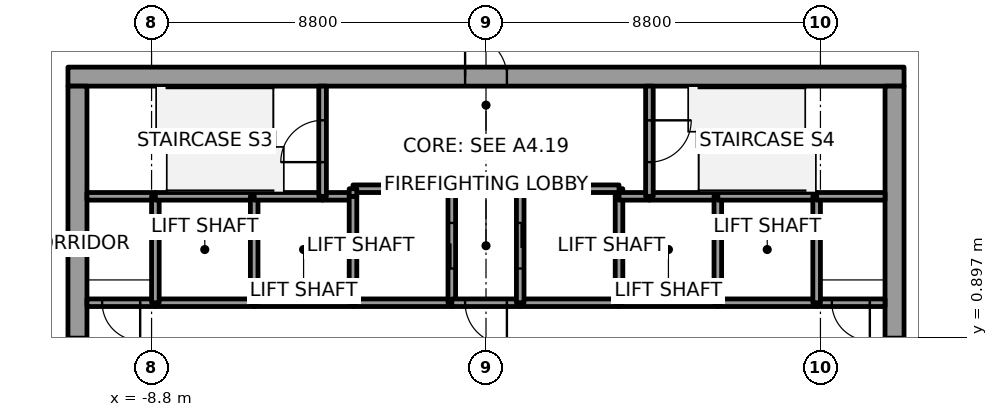
"""IFC4 building model, lengths in metres.
Left out: names, types, materials, properties, quantities, classifications, styles, units other than length and angle.
Written with IfcOpenShell. Run it as: python <this file> out.ifc"""

import sys

from ifc_helpers import new_model, si_unit, direction, frame, frame_2d, origin, place, context, subcontext, project, spatial, rectangle, extrude, element, fill, save


model = new_model("IFC4")
c1 = context("Model", 3, precision=1e-05, world=origin(), true_north=direction((0.0, 1.0)))
c2 = subcontext(c1, "Body", "Model", "MODEL_VIEW")
j1 = project(units=[si_unit("LENGTHUNIT", "METRE"), si_unit("PLANEANGLEUNIT", "RADIAN")], contexts=[c1])
p1 = place(None, origin())
s1 = spatial("IfcSite", under=j1, at=p1, CompositionType="ELEMENT")
p2 = place(p1, origin())
s2 = spatial("IfcBuilding", under=s1, at=p2, CompositionType="ELEMENT")
p3 = place(p2, frame((0.0, 0.0, 85.0)))
s3 = spatial("IfcBuildingStorey", under=s2, at=p3, CompositionType="ELEMENT", Elevation=85.0)
p4 = place(p3, frame((-11.0, 7.75, 0.0), z_axis=(0.0, 0.0, 1.0), x_axis=(1.0, 0.0, 0.0)))
e1 = element("IfcWall", 1, at=p4, inside=s3, PredefinedType="SHEAR", context=c2, shape_type="SweptSolid", body=[
    extrude(rectangle(XDim=22.0, YDim=0.5, at=frame_2d((11.0, 0.0))), origin(), (0.0, 0.0, 1.0), 3.7),
])
p5 = place(p4, frame((10.45, 0.0, 0.0)))
e2 = element("IfcOpeningElement", 2, at=p5, cuts=e1, PredefinedType="OPENING", context=c2, shape_type="SweptSolid", body=[
    extrude(rectangle(XDim=1.1, YDim=2.1, at=frame_2d((0.55, 1.05))), frame((0.0, 0.25, 0.0), z_axis=(0.0, -1.0, 0.0), x_axis=(1.0, 0.0, 0.0)), (0.0, 0.0, 1.0), 0.5),
])
p6 = place(p3, frame((-10.75, -7.5, 0.0), z_axis=(0.0, 0.0, 1.0), x_axis=(0.0, 1.0, 0.0)))
e3 = element("IfcWall", 3, at=p6, inside=s3, PredefinedType="SHEAR", context=c2, shape_type="SweptSolid", body=[
    extrude(rectangle(XDim=15.0, YDim=0.5, at=frame_2d((7.5, 0.0))), origin(), (0.0, 0.0, 1.0), 3.7),
])
p7 = place(p6, frame((6.6, 0.0, 0.0)))
e4 = element("IfcOpeningElement", 4, at=p7, cuts=e3, PredefinedType="OPENING", context=c2, shape_type="SweptSolid", body=[
    extrude(rectangle(XDim=1.8, YDim=2.1, at=frame_2d((0.9, 1.05))), frame((0.0, 0.25, 0.0), z_axis=(0.0, -1.0, 0.0), x_axis=(1.0, 0.0, 0.0)), (0.0, 0.0, 1.0), 0.5),
])
p8 = place(p3, frame((10.75, -7.5, 0.0), z_axis=(0.0, 0.0, 1.0), x_axis=(0.0, 1.0, 0.0)))
e5 = element("IfcWall", 5, at=p8, inside=s3, PredefinedType="SHEAR", context=c2, shape_type="SweptSolid", body=[
    extrude(rectangle(XDim=15.0, YDim=0.5, at=frame_2d((7.5, 0.0))), origin(), (0.0, 0.0, 1.0), 3.7),
])
p9 = place(p8, frame((6.6, 0.0, 0.0)))
e6 = element("IfcOpeningElement", 6, at=p9, cuts=e5, PredefinedType="OPENING", context=c2, shape_type="SweptSolid", body=[
    extrude(rectangle(XDim=1.8, YDim=2.1, at=frame_2d((0.9, 1.05))), frame((0.0, 0.25, 0.0), z_axis=(0.0, -1.0, 0.0), x_axis=(1.0, 0.0, 0.0)), (0.0, 0.0, 1.0), 0.5),
])
p10 = place(p3, frame((-8.7, 1.8, 0.0), z_axis=(0.0, 0.0, 1.0), x_axis=(-1.0, 0.0, 0.0)))
e7 = element("IfcWall", 7, at=p10, inside=s3, PredefinedType="SOLIDWALL", context=c2, shape_type="SweptSolid", body=[
    extrude(rectangle(XDim=1.8, YDim=0.2, at=frame_2d((0.9, 0.0))), origin(), (0.0, 0.0, 1.0), 3.55),
])
p11 = place(p10, frame((0.4, 0.0, 0.0)))
e8 = element("IfcOpeningElement", 8, at=p11, cuts=e7, PredefinedType="OPENING", context=c2, shape_type="SweptSolid", body=[
    extrude(rectangle(XDim=1.0, YDim=2.1, at=frame_2d((0.5, 1.05))), frame((0.0, 0.1, 0.0), z_axis=(0.0, -1.0, 0.0), x_axis=(1.0, 0.0, 0.0)), (0.0, 0.0, 1.0), 0.2),
])
p12 = place(p3, frame((-8.7, 4.6, 0.0), z_axis=(0.0, 0.0, 1.0), x_axis=(-1.0, 0.0, 0.0)))
e9 = element("IfcWall", 9, at=p12, inside=s3, PredefinedType="SOLIDWALL", context=c2, shape_type="SweptSolid", body=[
    extrude(rectangle(XDim=1.8, YDim=0.2, at=frame_2d((0.9, 0.0))), origin(), (0.0, 0.0, 1.0), 3.55),
])
p13 = place(p3, frame((-6.1, 1.8, 0.0), z_axis=(0.0, 0.0, 1.0), x_axis=(-1.0, 0.0, 0.0)))
e10 = element("IfcWall", 10, at=p13, inside=s3, PredefinedType="SOLIDWALL", context=c2, shape_type="SweptSolid", body=[
    extrude(rectangle(XDim=2.6, YDim=0.2, at=frame_2d((1.3, 0.0))), origin(), (0.0, 0.0, 1.0), 3.55),
])
p14 = place(p3, frame((-8.7, 1.8, 0.0), z_axis=(0.0, 0.0, 1.0), x_axis=(0.0, 1.0, 0.0)))
e11 = element("IfcWall", 11, at=p14, inside=s3, PredefinedType="SOLIDWALL", context=c2, shape_type="SweptSolid", body=[
    extrude(rectangle(XDim=2.8, YDim=0.2, at=frame_2d((1.4, 0.0))), origin(), (0.0, 0.0, 1.0), 3.55),
])
p15 = place(p3, frame((-6.1, 4.6, 0.0), z_axis=(0.0, 0.0, 1.0), x_axis=(-1.0, 0.0, 0.0)))
e12 = element("IfcWall", 12, at=p15, inside=s3, PredefinedType="SOLIDWALL", context=c2, shape_type="SweptSolid", body=[
    extrude(rectangle(XDim=2.6, YDim=0.2, at=frame_2d((1.3, 0.0))), origin(), (0.0, 0.0, 1.0), 3.55),
])
p16 = place(p3, frame((-3.5, 1.8, 0.0), z_axis=(0.0, 0.0, 1.0), x_axis=(-1.0, 0.0, 0.0)))
e13 = element("IfcWall", 13, at=p16, inside=s3, PredefinedType="SOLIDWALL", context=c2, shape_type="SweptSolid", body=[
    extrude(rectangle(XDim=2.6, YDim=0.2, at=frame_2d((1.3, 0.0))), origin(), (0.0, 0.0, 1.0), 3.55),
])
p17 = place(p3, frame((-6.1, 1.8, 0.0), z_axis=(0.0, 0.0, 1.0), x_axis=(0.0, 1.0, 0.0)))
e14 = element("IfcWall", 14, at=p17, inside=s3, PredefinedType="SOLIDWALL", context=c2, shape_type="SweptSolid", body=[
    extrude(rectangle(XDim=2.8, YDim=0.2, at=frame_2d((1.4, 0.0))), origin(), (0.0, 0.0, 1.0), 3.55),
])
p18 = place(p3, frame((-4.3, 4.6, 0.0), z_axis=(0.0, 0.0, 1.0), x_axis=(-1.0, 0.0, 0.0)))
e15 = element("IfcWall", 15, at=p18, inside=s3, PredefinedType="SOLIDWALL", context=c2, shape_type="SweptSolid", body=[
    extrude(rectangle(XDim=1.8, YDim=0.2, at=frame_2d((0.9, 0.0))), origin(), (0.0, 0.0, 1.0), 3.55),
])
p19 = place(p3, frame((-3.5, 4.6, 0.0), z_axis=(0.0, 0.0, 1.0), x_axis=(-1.0, 0.0, 0.0)))
e16 = element("IfcWall", 16, at=p19, inside=s3, PredefinedType="SOLIDWALL", context=c2, shape_type="SweptSolid", body=[
    extrude(rectangle(XDim=0.8, YDim=0.2, at=frame_2d((0.4, 0.0))), origin(), (0.0, 0.0, 1.0), 3.55),
])
p20 = place(p3, frame((-4.3, 4.6, 0.0), z_axis=(0.0, 0.0, 1.0), x_axis=(0.0, 1.0, 0.0)))
e17 = element("IfcWall", 17, at=p20, inside=s3, PredefinedType="SOLIDWALL", context=c2, shape_type="SweptSolid", body=[
    extrude(rectangle(XDim=2.9, YDim=0.2, at=frame_2d((1.45, 0.0))), origin(), (0.0, 0.0, 1.0), 3.55),
])
p21 = place(p20, frame((0.9, 0.0, 0.0)))
e18 = element("IfcOpeningElement", 18, at=p21, cuts=e17, PredefinedType="OPENING", context=c2, shape_type="SweptSolid", body=[
    extrude(rectangle(XDim=1.1, YDim=2.1, at=frame_2d((0.55, 1.05))), frame((0.0, 0.1, 0.0), z_axis=(0.0, -1.0, 0.0), x_axis=(1.0, 0.0, 0.0)), (0.0, 0.0, 1.0), 0.2),
])
p22 = place(p3, frame((-0.9, 1.8, 0.0), z_axis=(0.0, 0.0, 1.0), x_axis=(-1.0, 0.0, 0.0)))
e19 = element("IfcWall", 19, at=p22, inside=s3, PredefinedType="SOLIDWALL", context=c2, shape_type="SweptSolid", body=[
    extrude(rectangle(XDim=2.6, YDim=0.2, at=frame_2d((1.3, 0.0))), origin(), (0.0, 0.0, 1.0), 3.55),
])
p23 = place(p3, frame((-3.5, 4.6, 0.0), z_axis=(0.0, 0.0, 1.0), x_axis=(0.0, -1.0, 0.0)))
e20 = element("IfcWall", 20, at=p23, inside=s3, PredefinedType="SOLIDWALL", context=c2, shape_type="SweptSolid", body=[
    extrude(rectangle(XDim=2.8, YDim=0.2, at=frame_2d((1.4, 0.0))), origin(), (0.0, 0.0, 1.0), 3.55),
])
p24 = place(p3, frame((-0.9, 1.8, 0.0), z_axis=(0.0, 0.0, 1.0), x_axis=(0.0, 1.0, 0.0)))
e21 = element("IfcWall", 21, at=p24, inside=s3, PredefinedType="SOLIDWALL", context=c2, shape_type="SweptSolid", body=[
    extrude(rectangle(XDim=3.0, YDim=0.2, at=frame_2d((1.5, 0.0))), origin(), (0.0, 0.0, 1.0), 3.55),
])
p25 = place(p24, frame((0.9, 0.0, 0.0)))
e22 = element("IfcOpeningElement", 22, at=p25, cuts=e21, PredefinedType="OPENING", context=c2, shape_type="SweptSolid", body=[
    extrude(rectangle(XDim=1.2, YDim=2.1, at=frame_2d((0.6, 1.05))), frame((0.0, 0.1, 0.0), z_axis=(0.0, -1.0, 0.0), x_axis=(1.0, 0.0, 0.0)), (0.0, 0.0, 1.0), 0.2),
])
p26 = place(p3, frame((-0.9, 4.8, 0.0), z_axis=(0.0, 0.0, 1.0), x_axis=(-1.0, 0.0, 0.0)))
e23 = element("IfcWall", 23, at=p26, inside=s3, PredefinedType="SOLIDWALL", context=c2, shape_type="SweptSolid", body=[
    extrude(rectangle(XDim=2.6, YDim=0.2, at=frame_2d((1.3, 0.0))), origin(), (0.0, 0.0, 1.0), 3.55),
])
p27 = place(p3, frame((-3.5, 4.8, 0.0), z_axis=(0.0, 0.0, 1.0), x_axis=(0.0, -1.0, 0.0)))
e24 = element("IfcWall", 24, at=p27, inside=s3, PredefinedType="SOLIDWALL", context=c2, shape_type="SweptSolid", body=[
    extrude(rectangle(XDim=0.2, YDim=0.2, at=frame_2d((0.1, 0.0))), origin(), (0.0, 0.0, 1.0), 3.55),
])
p28 = place(p3, frame((0.9, 1.8, 0.0), z_axis=(0.0, 0.0, 1.0), x_axis=(-1.0, 0.0, 0.0)))
e25 = element("IfcWall", 25, at=p28, inside=s3, PredefinedType="SOLIDWALL", context=c2, shape_type="SweptSolid", body=[
    extrude(rectangle(XDim=1.8, YDim=0.2, at=frame_2d((0.9, 0.0))), origin(), (0.0, 0.0, 1.0), 3.55),
])
p29 = place(p28, frame((0.35, 0.0, 0.0)))
e26 = element("IfcOpeningElement", 26, at=p29, cuts=e25, PredefinedType="OPENING", context=c2, shape_type="SweptSolid", body=[
    extrude(rectangle(XDim=1.1, YDim=2.1, at=frame_2d((0.55, 1.05))), frame((0.0, 0.1, 0.0), z_axis=(0.0, -1.0, 0.0), x_axis=(1.0, 0.0, 0.0)), (0.0, 0.0, 1.0), 0.2),
])
p30 = place(p3, frame((3.5, 1.8, 0.0), z_axis=(0.0, 0.0, 1.0), x_axis=(-1.0, 0.0, 0.0)))
e27 = element("IfcWall", 27, at=p30, inside=s3, PredefinedType="SOLIDWALL", context=c2, shape_type="SweptSolid", body=[
    extrude(rectangle(XDim=2.6, YDim=0.2, at=frame_2d((1.3, 0.0))), origin(), (0.0, 0.0, 1.0), 3.55),
])
p31 = place(p3, frame((3.5, 4.6, 0.0), z_axis=(0.0, 0.0, 1.0), x_axis=(0.0, 1.0, 0.0)))
e28 = element("IfcWall", 28, at=p31, inside=s3, PredefinedType="SOLIDWALL", context=c2, shape_type="SweptSolid", body=[
    extrude(rectangle(XDim=0.2, YDim=0.2, at=frame_2d((0.1, 0.0))), origin(), (0.0, 0.0, 1.0), 3.55),
])
p32 = place(p3, frame((3.5, 4.8, 0.0), z_axis=(0.0, 0.0, 1.0), x_axis=(-1.0, 0.0, 0.0)))
e29 = element("IfcWall", 29, at=p32, inside=s3, PredefinedType="SOLIDWALL", context=c2, shape_type="SweptSolid", body=[
    extrude(rectangle(XDim=2.6, YDim=0.2, at=frame_2d((1.3, 0.0))), origin(), (0.0, 0.0, 1.0), 3.55),
])
p33 = place(p3, frame((0.9, 4.8, 0.0), z_axis=(0.0, 0.0, 1.0), x_axis=(0.0, -1.0, 0.0)))
e30 = element("IfcWall", 30, at=p33, inside=s3, PredefinedType="SOLIDWALL", context=c2, shape_type="SweptSolid", body=[
    extrude(rectangle(XDim=3.0, YDim=0.2, at=frame_2d((1.5, 0.0))), origin(), (0.0, 0.0, 1.0), 3.55),
])
p34 = place(p33, frame((0.9, 0.0, 0.0)))
e31 = element("IfcOpeningElement", 31, at=p34, cuts=e30, PredefinedType="OPENING", context=c2, shape_type="SweptSolid", body=[
    extrude(rectangle(XDim=1.2, YDim=2.1, at=frame_2d((0.6, 1.05))), frame((0.0, 0.1, 0.0), z_axis=(0.0, -1.0, 0.0), x_axis=(1.0, 0.0, 0.0)), (0.0, 0.0, 1.0), 0.2),
])
p35 = place(p3, frame((6.1, 1.8, 0.0), z_axis=(0.0, 0.0, 1.0), x_axis=(-1.0, 0.0, 0.0)))
e32 = element("IfcWall", 32, at=p35, inside=s3, PredefinedType="SOLIDWALL", context=c2, shape_type="SweptSolid", body=[
    extrude(rectangle(XDim=2.6, YDim=0.2, at=frame_2d((1.3, 0.0))), origin(), (0.0, 0.0, 1.0), 3.55),
])
p36 = place(p3, frame((3.5, 1.8, 0.0), z_axis=(0.0, 0.0, 1.0), x_axis=(0.0, 1.0, 0.0)))
e33 = element("IfcWall", 33, at=p36, inside=s3, PredefinedType="SOLIDWALL", context=c2, shape_type="SweptSolid", body=[
    extrude(rectangle(XDim=2.8, YDim=0.2, at=frame_2d((1.4, 0.0))), origin(), (0.0, 0.0, 1.0), 3.55),
])
p37 = place(p3, frame((4.3, 4.6, 0.0), z_axis=(0.0, 0.0, 1.0), x_axis=(-1.0, 0.0, 0.0)))
e34 = element("IfcWall", 34, at=p37, inside=s3, PredefinedType="SOLIDWALL", context=c2, shape_type="SweptSolid", body=[
    extrude(rectangle(XDim=0.8, YDim=0.2, at=frame_2d((0.4, 0.0))), origin(), (0.0, 0.0, 1.0), 3.55),
])
p38 = place(p3, frame((6.1, 4.6, 0.0), z_axis=(0.0, 0.0, 1.0), x_axis=(-1.0, 0.0, 0.0)))
e35 = element("IfcWall", 35, at=p38, inside=s3, PredefinedType="SOLIDWALL", context=c2, shape_type="SweptSolid", body=[
    extrude(rectangle(XDim=1.8, YDim=0.2, at=frame_2d((0.9, 0.0))), origin(), (0.0, 0.0, 1.0), 3.55),
])
p39 = place(p3, frame((4.3, 7.5, 0.0), z_axis=(0.0, 0.0, 1.0), x_axis=(0.0, -1.0, 0.0)))
e36 = element("IfcWall", 36, at=p39, inside=s3, PredefinedType="SOLIDWALL", context=c2, shape_type="SweptSolid", body=[
    extrude(rectangle(XDim=2.9, YDim=0.2, at=frame_2d((1.45, 0.0))), origin(), (0.0, 0.0, 1.0), 3.55),
])
p40 = place(p39, frame((0.9, 0.0, 0.0)))
e37 = element("IfcOpeningElement", 37, at=p40, cuts=e36, PredefinedType="OPENING", context=c2, shape_type="SweptSolid", body=[
    extrude(rectangle(XDim=1.1, YDim=2.1, at=frame_2d((0.55, 1.05))), frame((0.0, 0.1, 0.0), z_axis=(0.0, -1.0, 0.0), x_axis=(1.0, 0.0, 0.0)), (0.0, 0.0, 1.0), 0.2),
])
p41 = place(p3, frame((8.7, 1.8, 0.0), z_axis=(0.0, 0.0, 1.0), x_axis=(-1.0, 0.0, 0.0)))
e38 = element("IfcWall", 38, at=p41, inside=s3, PredefinedType="SOLIDWALL", context=c2, shape_type="SweptSolid", body=[
    extrude(rectangle(XDim=2.6, YDim=0.2, at=frame_2d((1.3, 0.0))), origin(), (0.0, 0.0, 1.0), 3.55),
])
p42 = place(p3, frame((6.1, 1.8, 0.0), z_axis=(0.0, 0.0, 1.0), x_axis=(0.0, 1.0, 0.0)))
e39 = element("IfcWall", 39, at=p42, inside=s3, PredefinedType="SOLIDWALL", context=c2, shape_type="SweptSolid", body=[
    extrude(rectangle(XDim=2.8, YDim=0.2, at=frame_2d((1.4, 0.0))), origin(), (0.0, 0.0, 1.0), 3.55),
])
p43 = place(p3, frame((8.7, 4.6, 0.0), z_axis=(0.0, 0.0, 1.0), x_axis=(-1.0, 0.0, 0.0)))
e40 = element("IfcWall", 40, at=p43, inside=s3, PredefinedType="SOLIDWALL", context=c2, shape_type="SweptSolid", body=[
    extrude(rectangle(XDim=2.6, YDim=0.2, at=frame_2d((1.3, 0.0))), origin(), (0.0, 0.0, 1.0), 3.55),
])
p44 = place(p3, frame((10.5, 1.8, 0.0), z_axis=(0.0, 0.0, 1.0), x_axis=(-1.0, 0.0, 0.0)))
e41 = element("IfcWall", 41, at=p44, inside=s3, PredefinedType="SOLIDWALL", context=c2, shape_type="SweptSolid", body=[
    extrude(rectangle(XDim=1.8, YDim=0.2, at=frame_2d((0.9, 0.0))), origin(), (0.0, 0.0, 1.0), 3.55),
])
p45 = place(p44, frame((0.4, 0.0, 0.0)))
e42 = element("IfcOpeningElement", 42, at=p45, cuts=e41, PredefinedType="OPENING", context=c2, shape_type="SweptSolid", body=[
    extrude(rectangle(XDim=1.0, YDim=2.1, at=frame_2d((0.5, 1.05))), frame((0.0, 0.1, 0.0), z_axis=(0.0, -1.0, 0.0), x_axis=(1.0, 0.0, 0.0)), (0.0, 0.0, 1.0), 0.2),
])
p46 = place(p3, frame((8.7, 4.6, 0.0), z_axis=(0.0, 0.0, 1.0), x_axis=(0.0, -1.0, 0.0)))
e43 = element("IfcWall", 43, at=p46, inside=s3, PredefinedType="SOLIDWALL", context=c2, shape_type="SweptSolid", body=[
    extrude(rectangle(XDim=2.8, YDim=0.2, at=frame_2d((1.4, 0.0))), origin(), (0.0, 0.0, 1.0), 3.55),
])
p47 = place(p3, frame((10.5, 4.6, 0.0), z_axis=(0.0, 0.0, 1.0), x_axis=(-1.0, 0.0, 0.0)))
e44 = element("IfcWall", 44, at=p47, inside=s3, PredefinedType="SOLIDWALL", context=c2, shape_type="SweptSolid", body=[
    extrude(rectangle(XDim=1.8, YDim=0.2, at=frame_2d((0.9, 0.0))), origin(), (0.0, 0.0, 1.0), 3.55),
])
p48 = place(p25, origin())
e45 = element("IfcDoor", 45, at=p48, inside=s3, OperationType="SLIDING_TO_RIGHT", PredefinedType="DOOR", context=c2, shape_type="SweptSolid", body=[
    extrude(rectangle(XDim=1.2, YDim=2.1, at=frame_2d((0.6, 1.05))), frame((0.0, 0.025, 0.0), z_axis=(0.0, -1.0, 0.0), x_axis=(1.0, 0.0, 0.0)), (0.0, 0.0, 1.0), 0.05),
])
fill(e22, e45)
p49 = place(p34, origin())
e46 = element("IfcDoor", 46, at=p49, inside=s3, OperationType="SLIDING_TO_LEFT", PredefinedType="DOOR", context=c2, shape_type="SweptSolid", body=[
    extrude(rectangle(XDim=1.2, YDim=2.1, at=frame_2d((0.6, 1.05))), frame((0.0, 0.025, 0.0), z_axis=(0.0, -1.0, 0.0), x_axis=(1.0, 0.0, 0.0)), (0.0, 0.0, 1.0), 0.05),
])
fill(e31, e46)
p50 = place(p29, origin())
e47 = element("IfcDoor", 47, at=p50, inside=s3, OperationType="SINGLE_SWING_LEFT", PredefinedType="DOOR", context=c2, shape_type="SweptSolid", body=[
    extrude(rectangle(XDim=1.1, YDim=2.1, at=frame_2d((0.55, 1.05))), frame((0.0, 0.025, 0.0), z_axis=(0.0, -1.0, 0.0), x_axis=(1.0, 0.0, 0.0)), (0.0, 0.0, 1.0), 0.05),
])
fill(e26, e47)
p51 = place(p11, origin())
e48 = element("IfcDoor", 48, at=p51, inside=s3, OperationType="SINGLE_SWING_RIGHT", PredefinedType="DOOR", context=c2, shape_type="SweptSolid", body=[
    extrude(rectangle(XDim=1.0, YDim=2.1, at=frame_2d((0.5, 1.05))), frame((0.0, 0.025, 0.0), z_axis=(0.0, -1.0, 0.0), x_axis=(1.0, 0.0, 0.0)), (0.0, 0.0, 1.0), 0.05),
])
fill(e8, e48)
p52 = place(p45, origin())
e49 = element("IfcDoor", 49, at=p52, inside=s3, OperationType="SINGLE_SWING_LEFT", PredefinedType="DOOR", context=c2, shape_type="SweptSolid", body=[
    extrude(rectangle(XDim=1.0, YDim=2.1, at=frame_2d((0.5, 1.05))), frame((0.0, 0.025, 0.0), z_axis=(0.0, -1.0, 0.0), x_axis=(1.0, 0.0, 0.0)), (0.0, 0.0, 1.0), 0.05),
])
fill(e42, e49)
p53 = place(p21, origin())
e50 = element("IfcDoor", 50, at=p53, inside=s3, OperationType="SINGLE_SWING_LEFT", PredefinedType="DOOR", context=c2, shape_type="SweptSolid", body=[
    extrude(rectangle(XDim=1.1, YDim=2.1, at=frame_2d((0.55, 1.05))), frame((0.0, 0.025, 0.0), z_axis=(0.0, -1.0, 0.0), x_axis=(1.0, 0.0, 0.0)), (0.0, 0.0, 1.0), 0.05),
])
fill(e18, e50)
p54 = place(p40, origin())
e51 = element("IfcDoor", 51, at=p54, inside=s3, OperationType="SINGLE_SWING_LEFT", PredefinedType="DOOR", context=c2, shape_type="SweptSolid", body=[
    extrude(rectangle(XDim=1.1, YDim=2.1, at=frame_2d((0.55, 1.05))), frame((0.0, 0.025, 0.0), z_axis=(0.0, -1.0, 0.0), x_axis=(1.0, 0.0, 0.0)), (0.0, 0.0, 1.0), 0.05),
])
fill(e37, e51)
p55 = place(p7, origin())
e52 = element("IfcDoor", 52, at=p55, inside=s3, OperationType="DOUBLE_DOOR_SINGLE_SWING", PredefinedType="DOOR", context=c2, shape_type="SweptSolid", body=[
    extrude(rectangle(XDim=1.8, YDim=2.1, at=frame_2d((0.9, 1.05))), frame((0.0, 0.025, 0.0), z_axis=(0.0, -1.0, 0.0), x_axis=(1.0, 0.0, 0.0)), (0.0, 0.0, 1.0), 0.05),
])
fill(e4, e52)
p56 = place(p9, origin())
e53 = element("IfcDoor", 53, at=p56, inside=s3, OperationType="DOUBLE_DOOR_SINGLE_SWING", PredefinedType="DOOR", context=c2, shape_type="SweptSolid", body=[
    extrude(rectangle(XDim=1.8, YDim=2.1, at=frame_2d((0.9, 1.05))), frame((0.0, 0.025, 0.0), z_axis=(0.0, -1.0, 0.0), x_axis=(1.0, 0.0, 0.0)), (0.0, 0.0, 1.0), 0.05),
])
fill(e6, e53)
p57 = place(p5, origin())
e54 = element("IfcDoor", 54, at=p57, inside=s3, OperationType="SINGLE_SWING_LEFT", PredefinedType="DOOR", context=c2, shape_type="SweptSolid", body=[
    extrude(rectangle(XDim=1.1, YDim=2.1, at=frame_2d((0.55, 1.05))), frame((0.0, 0.025, 0.0), z_axis=(0.0, -1.0, 0.0), x_axis=(1.0, 0.0, 0.0)), (0.0, 0.0, 1.0), 0.05),
])
fill(e2, e54)
save(model, sys.argv[1])
